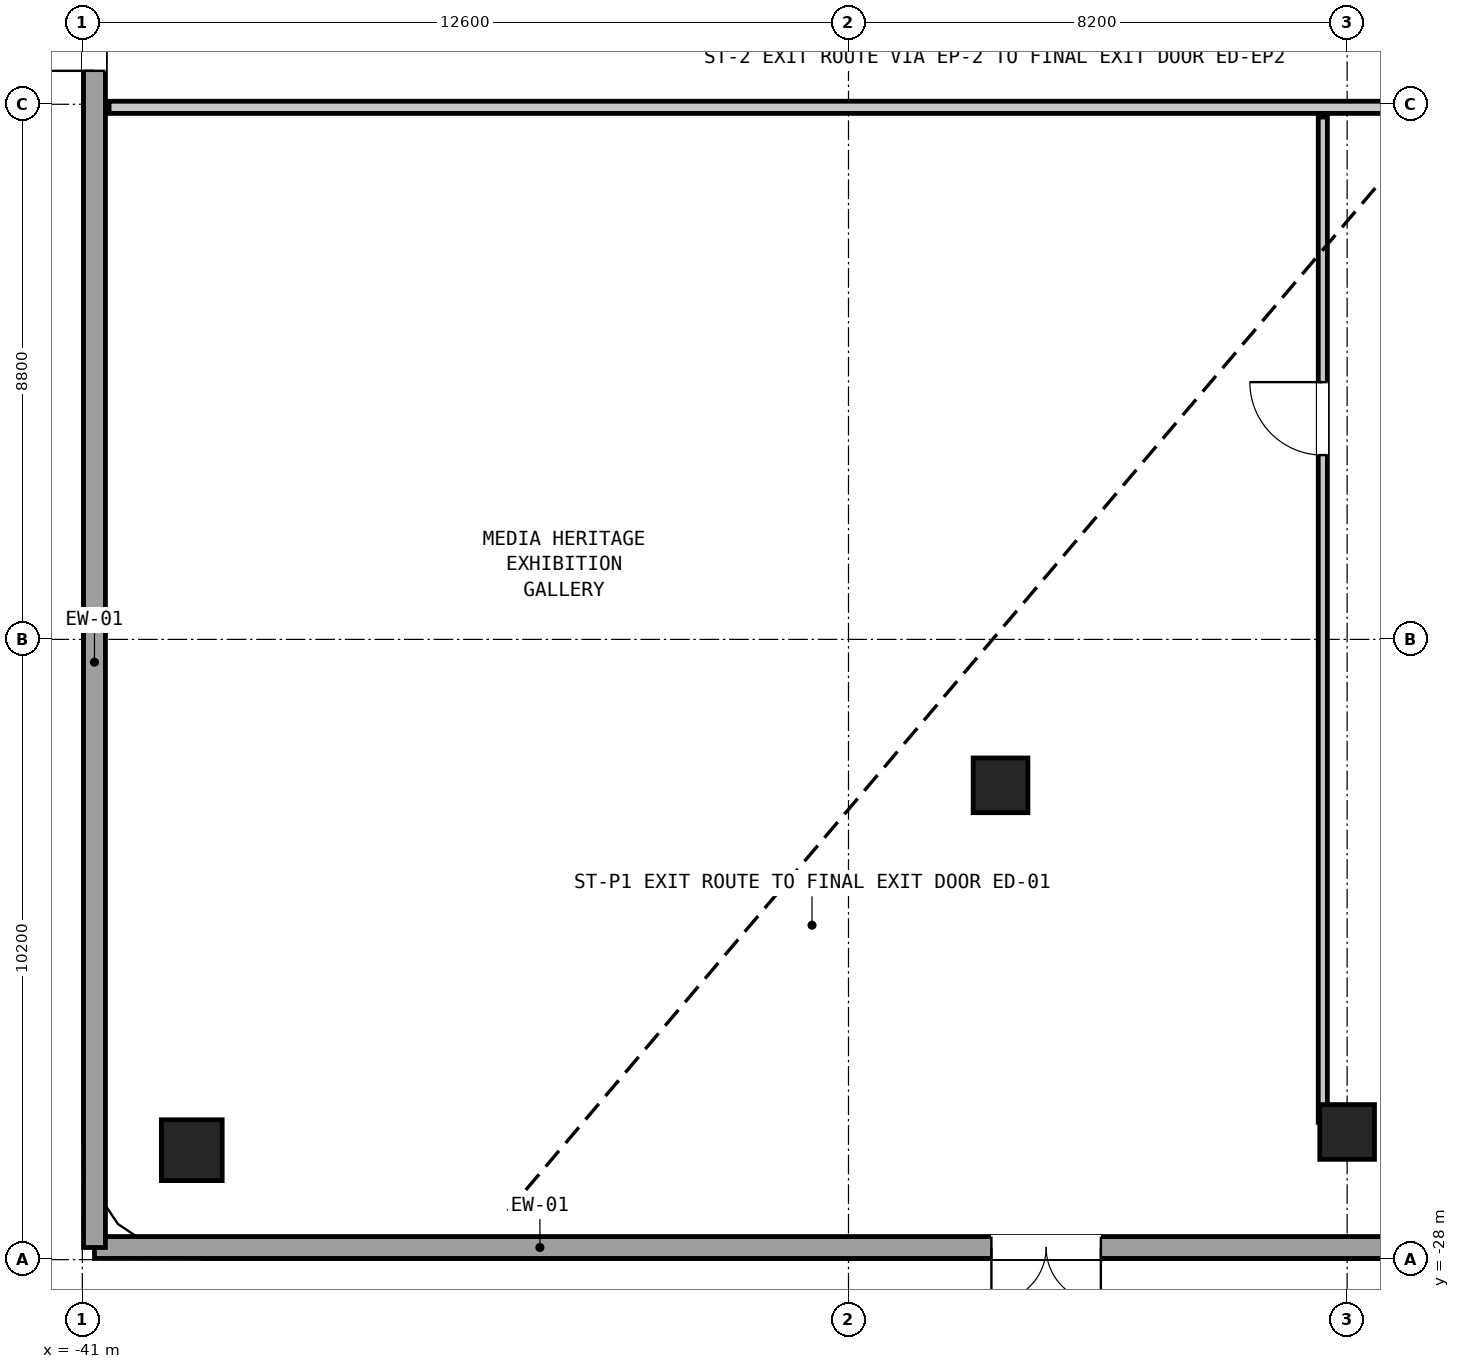
"""IFC4 building model, lengths in metres.
Left out: names, types, materials, properties, quantities, classifications, styles, units other than length and angle.
Written with IfcOpenShell. Run it as: python <this file> out.ifc"""

import sys

from ifc_helpers import new_model, si_unit, direction, frame, frame_2d, origin, origin_2d, place, context, subcontext, project, spatial, rectangle, hollow_rectangle, extrude, element, fill, save


model = new_model("IFC4")
c1 = context("Model", 3, precision=1e-05, world=origin(), true_north=direction((0.0, 1.0)))
c2 = subcontext(c1, "Body", "Model", "MODEL_VIEW")
j1 = project(units=[si_unit("LENGTHUNIT", "METRE"), si_unit("PLANEANGLEUNIT", "RADIAN")], contexts=[c1])
p1 = place(None, origin())
s1 = spatial("IfcSite", under=j1, at=p1, CompositionType="ELEMENT")
p2 = place(p1, origin())
s2 = spatial("IfcBuilding", under=s1, at=p2, CompositionType="ELEMENT")
p3 = place(p2, origin())
s3 = spatial("IfcBuildingStorey", under=s2, at=p3, CompositionType="ELEMENT", Elevation=0.0)
for number, where, z_axis, x_axis in (
    (1, (-20.2, -25.9, 0.0), (0.0, 0.0, 1.0), (1.0, 0.0, 0.0)),
    (2, (-25.9, -20.2, 0.0), (0.0, 0.0, 1.0), (0.0, 1.0, 0.0)),
):
    element("IfcColumn", number, at=place(p3, frame(where, z_axis=z_axis, x_axis=x_axis)), inside=s3, PredefinedType="COLUMN", context=c2, shape_type="SweptSolid", body=[
        extrude(hollow_rectangle(XDim=0.9, YDim=0.9, WallThickness=0.055, at=origin_2d()), origin(), (0.0, 0.0, 1.0), 5.1),
    ])
p4 = place(p3, frame((-39.2, -26.2, 0.0), z_axis=(0.0, 0.0, 1.0), x_axis=(1.0, 0.0, 0.0)))
e3 = element("IfcColumn", 3, at=p4, inside=s3, PredefinedType="COLUMN", context=c2, shape_type="SweptSolid", body=[
    extrude(rectangle(XDim=1.0, YDim=1.0, at=origin_2d()), origin(), (0.0, 0.0, 1.0), 5.1),
])
p5 = place(p3, frame((-9.84, -27.8, 0.0), z_axis=(0.0, 0.0, 1.0), x_axis=(-1.0, 0.0, 0.0)))
e4 = element("IfcWall", 4, at=p5, inside=s3, PredefinedType="SOLIDWALL", context=c2, shape_type="SweptSolid", body=[
    extrude(rectangle(XDim=30.96, YDim=0.36, at=frame_2d((15.48, 0.0))), origin(), (0.0, 0.0, 1.0), 4.78),
])
p6 = place(p5, frame((4.41, 0.0, 0.0)))
e5 = element("IfcOpeningElement", 5, at=p6, cuts=e4, PredefinedType="OPENING", context=c2, shape_type="SweptSolid", body=[
    extrude(rectangle(XDim=1.8, YDim=2.25, at=frame_2d((0.9, 1.125))), frame((0.0, 0.192, 0.0), z_axis=(0.0, -1.0, 0.0), x_axis=(1.0, 0.0, 0.0)), (0.0, 0.0, 1.0), 0.384),
])
p7 = place(p5, frame((14.41, 0.0, 0.0)))
e6 = element("IfcOpeningElement", 6, at=p7, cuts=e4, PredefinedType="OPENING", context=c2, shape_type="SweptSolid", body=[
    extrude(rectangle(XDim=1.8, YDim=2.4, at=frame_2d((0.9, 1.2))), frame((0.0, 0.192, 0.0), z_axis=(0.0, -1.0, 0.0), x_axis=(1.0, 0.0, 0.0)), (0.0, 0.0, 1.0), 0.384),
])
p8 = place(p3, frame((-40.8, -27.8, 0.0), z_axis=(0.0, 0.0, 1.0), x_axis=(0.0, 1.0, 0.0)))
e7 = element("IfcWall", 7, at=p8, inside=s3, PredefinedType="SOLIDWALL", context=c2, shape_type="SweptSolid", body=[
    extrude(rectangle(XDim=27.8, YDim=0.36, at=frame_2d((13.9, 0.0))), origin(), (0.0, 0.0, 1.0), 4.78),
])
p9 = place(p8, frame((19.35, 0.0, 0.0)))
e8 = element("IfcOpeningElement", 8, at=p9, cuts=e7, PredefinedType="OPENING", context=c2, shape_type="SweptSolid", body=[
    extrude(rectangle(XDim=1.8, YDim=2.25, at=frame_2d((0.9, 1.125))), frame((0.0, 0.192, 0.0), z_axis=(0.0, -1.0, 0.0), x_axis=(1.0, 0.0, 0.0)), (0.0, 0.0, 1.0), 0.384),
])
p10 = place(p3, frame((-40.56, -9.05, 0.0), z_axis=(0.0, 0.0, 1.0), x_axis=(1.0, 0.0, 0.0)))
e9 = element("IfcWall", 9, at=p10, inside=s3, PredefinedType="PARTITIONING", context=c2, shape_type="SweptSolid", body=[
    extrude(rectangle(XDim=30.92, YDim=0.2, at=frame_2d((15.46, 0.0))), origin(), (0.0, 0.0, 1.0), 4.78),
])
p11 = place(p3, frame((-20.6, -25.74, 0.0), z_axis=(0.0, 0.0, 1.0), x_axis=(0.0, 1.0, 0.0)))
e10 = element("IfcWall", 10, at=p11, inside=s3, PredefinedType="PARTITIONING", context=c2, shape_type="SweptSolid", body=[
    extrude(rectangle(XDim=16.53, YDim=0.15, at=frame_2d((8.265, 0.0))), origin(), (0.0, 0.0, 1.0), 3.833),
])
p12 = place(p11, frame((10.971, 0.0, 0.0)))
e11 = element("IfcOpeningElement", 11, at=p12, cuts=e10, PredefinedType="OPENING", context=c2, shape_type="SweptSolid", body=[
    extrude(rectangle(XDim=1.2, YDim=2.1, at=frame_2d((0.6, 1.05))), frame((0.0, 0.087, 0.0), z_axis=(0.0, -1.0, 0.0), x_axis=(1.0, 0.0, 0.0)), (0.0, 0.0, 1.0), 0.174),
])
p13 = place(p7, origin())
e12 = element("IfcDoor", 12, at=p13, inside=s3, OperationType="DOUBLE_DOOR_SINGLE_SWING", PredefinedType="DOOR", context=c2, shape_type="SweptSolid", body=[
    extrude(rectangle(XDim=1.8, YDim=2.4, at=frame_2d((0.9, 1.2))), frame((0.0, 0.025, 0.0), z_axis=(0.0, -1.0, 0.0), x_axis=(1.0, 0.0, 0.0)), (0.0, 0.0, 1.0), 0.05),
])
fill(e6, e12)
p14 = place(p9, origin())
e13 = element("IfcDoor", 13, at=p14, inside=s3, OperationType="DOUBLE_DOOR_SINGLE_SWING", PredefinedType="DOOR", context=c2, shape_type="SweptSolid", body=[
    extrude(rectangle(XDim=1.8, YDim=2.25, at=frame_2d((0.9, 1.125))), frame((0.0, 0.025, 0.0), z_axis=(0.0, -1.0, 0.0), x_axis=(1.0, 0.0, 0.0)), (0.0, 0.0, 1.0), 0.05),
])
fill(e8, e13)
p15 = place(p12, origin())
e14 = element("IfcDoor", 14, at=p15, inside=s3, OperationType="SINGLE_SWING_RIGHT", PredefinedType="DOOR", context=c2, shape_type="SweptSolid", body=[
    extrude(rectangle(XDim=1.2, YDim=2.1, at=frame_2d((0.6, 1.05))), frame((0.0, 0.025, 0.0), z_axis=(0.0, -1.0, 0.0), x_axis=(1.0, 0.0, 0.0)), (0.0, 0.0, 1.0), 0.05),
])
fill(e11, e14)
save(model, sys.argv[1])
